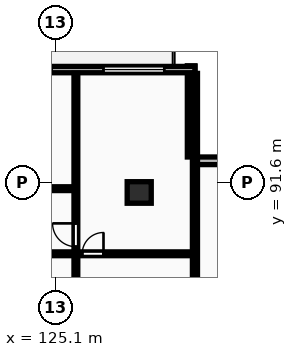
"""IFC4 building model, lengths in metres.
Left out: names, types, materials, properties, quantities, classifications, styles, units other than length and angle.
Written with IfcOpenShell. Run it as: python <this file> out.ifc"""

import sys

from ifc_helpers import new_model, si_unit, direction, frame, frame_2d, origin, origin_2d, place, context, subcontext, project, spatial, rectangle, extrude, element, fill, save


model = new_model("IFC4")
c1 = context("Model", 3, precision=1e-05, world=origin(), true_north=direction((0.0, 1.0)))
c2 = subcontext(c1, "Body", "Model", "MODEL_VIEW")
j1 = project(units=[si_unit("LENGTHUNIT", "METRE"), si_unit("PLANEANGLEUNIT", "RADIAN")], contexts=[c1])
p1 = place(None, origin())
s1 = spatial("IfcSite", under=j1, at=p1, CompositionType="ELEMENT")
p2 = place(p1, origin())
s2 = spatial("IfcBuilding", under=s1, at=p2, CompositionType="ELEMENT")
p3 = place(p2, frame((0.0, 0.0, 100.3)))
s3 = spatial("IfcBuildingStorey", under=s2, at=p3, CompositionType="ELEMENT", Elevation=100.3)
p4 = place(p3, frame((128.4, 91.2, 0.0), z_axis=(0.0, 0.0, 1.0), x_axis=(1.0, 0.0, 0.0)))
e1 = element("IfcColumn", 1, at=p4, inside=s3, PredefinedType="COLUMN", context=c2, shape_type="SweptSolid", body=[
    extrude(rectangle(XDim=0.95, YDim=0.85, at=origin_2d()), origin(), (0.0, 0.0, 1.0), 3.25),
])
for number, where, z_axis, x_axis in (
    (2, (134.2, 92.45, 0.0), (0.0, 0.0, 1.0), (-1.0, 0.0, 0.0)),
    (3, (130.45, 92.6, 0.0), (0.0, 0.0, 1.0), (0.0, 1.0, 0.0)),
):
    element("IfcWall", number, at=place(p3, frame(where, z_axis=z_axis, x_axis=x_axis)), inside=s3, PredefinedType="STANDARD", context=c2, shape_type="SweptSolid", body=[
        extrude(rectangle(XDim=3.6, YDim=0.3, at=frame_2d((1.8, 0.0))), origin(), (0.0, 0.0, 1.0), 2.97),
    ])
p5 = place(p3, frame((130.6, 96.05, 0.0), z_axis=(0.0, 0.0, 1.0), x_axis=(-1.0, 0.0, 0.0)))
e4 = element("IfcWall", 4, at=p5, inside=s3, PredefinedType="STANDARD", context=c2, shape_type="SweptSolid", body=[
    extrude(rectangle(XDim=73.0, YDim=0.25, at=frame_2d((36.5, 0.0))), origin(), (0.0, 0.0, 1.0), 2.97),
])
p6 = place(p5, frame((68.242, 0.0, 0.0)))
e5 = element("IfcOpeningElement", 5, at=p6, cuts=e4, PredefinedType="OPENING", context=c2, shape_type="SweptSolid", body=[
    extrude(rectangle(XDim=1.8, YDim=2.2, at=frame_2d((0.9, 1.1))), frame((0.0, 0.135, 0.0), z_axis=(0.0, -1.0, 0.0), x_axis=(1.0, 0.0, 0.0)), (0.0, 0.0, 1.0), 0.27),
])
p7 = place(p5, frame((59.046, 0.0, 0.85)))
e6 = element("IfcOpeningElement", 6, at=p7, cuts=e4, PredefinedType="OPENING", context=c2, shape_type="SweptSolid", body=[
    extrude(rectangle(XDim=2.4, YDim=1.9, at=frame_2d((1.2, 0.95))), frame((0.0, 0.135, 0.0), z_axis=(0.0, -1.0, 0.0), x_axis=(1.0, 0.0, 0.0)), (0.0, 0.0, 1.0), 0.27),
])
p8 = place(p5, frame((50.012, 0.0, 0.0)))
e7 = element("IfcOpeningElement", 7, at=p8, cuts=e4, PredefinedType="OPENING", context=c2, shape_type="SweptSolid", body=[
    extrude(rectangle(XDim=1.8, YDim=2.2, at=frame_2d((0.9, 1.1))), frame((0.0, 0.135, 0.0), z_axis=(0.0, -1.0, 0.0), x_axis=(1.0, 0.0, 0.0)), (0.0, 0.0, 1.0), 0.27),
])
p9 = place(p5, frame((40.536, 0.0, 0.85)))
e8 = element("IfcOpeningElement", 8, at=p9, cuts=e4, PredefinedType="OPENING", context=c2, shape_type="SweptSolid", body=[
    extrude(rectangle(XDim=2.4, YDim=1.9, at=frame_2d((1.2, 0.95))), frame((0.0, 0.135, 0.0), z_axis=(0.0, -1.0, 0.0), x_axis=(1.0, 0.0, 0.0)), (0.0, 0.0, 1.0), 0.27),
])
p10 = place(p5, frame((30.67, 0.0, 0.0)))
e9 = element("IfcOpeningElement", 9, at=p10, cuts=e4, PredefinedType="OPENING", context=c2, shape_type="SweptSolid", body=[
    extrude(rectangle(XDim=1.8, YDim=2.2, at=frame_2d((0.9, 1.1))), frame((0.0, 0.135, 0.0), z_axis=(0.0, -1.0, 0.0), x_axis=(1.0, 0.0, 0.0)), (0.0, 0.0, 1.0), 0.27),
])
p11 = place(p5, frame((20.781, 0.0, 0.0)))
e10 = element("IfcOpeningElement", 10, at=p11, cuts=e4, PredefinedType="OPENING", context=c2, shape_type="SweptSolid", body=[
    extrude(rectangle(XDim=1.8, YDim=2.2, at=frame_2d((0.9, 1.1))), frame((0.0, 0.135, 0.0), z_axis=(0.0, -1.0, 0.0), x_axis=(1.0, 0.0, 0.0)), (0.0, 0.0, 1.0), 0.27),
])
p12 = place(p5, frame((9.423, 0.0, 0.85)))
e11 = element("IfcOpeningElement", 11, at=p12, cuts=e4, PredefinedType="OPENING", context=c2, shape_type="SweptSolid", body=[
    extrude(rectangle(XDim=1.8, YDim=1.8, at=frame_2d((0.9, 0.9))), frame((0.0, 0.135, 0.0), z_axis=(0.0, -1.0, 0.0), x_axis=(1.0, 0.0, 0.0)), (0.0, 0.0, 1.0), 0.27),
])
p13 = place(p5, frame((5.66, 0.0, 0.85)))
e12 = element("IfcOpeningElement", 12, at=p13, cuts=e4, PredefinedType="OPENING", context=c2, shape_type="SweptSolid", body=[
    extrude(rectangle(XDim=1.8, YDim=1.8, at=frame_2d((0.9, 0.9))), frame((0.0, 0.135, 0.0), z_axis=(0.0, -1.0, 0.0), x_axis=(1.0, 0.0, 0.0)), (0.0, 0.0, 1.0), 0.27),
])
p14 = place(p5, frame((13.451, 0.0, 0.0)))
e13 = element("IfcOpeningElement", 13, at=p14, cuts=e4, PredefinedType="OPENING", context=c2, shape_type="SweptSolid", body=[
    extrude(rectangle(XDim=1.8, YDim=2.2, at=frame_2d((0.9, 1.1))), frame((0.0, 0.135, 0.0), z_axis=(0.0, -1.0, 0.0), x_axis=(1.0, 0.0, 0.0)), (0.0, 0.0, 1.0), 0.27),
])
p15 = place(p5, frame((1.21, 0.0, 0.85)))
e14 = element("IfcOpeningElement", 14, at=p15, cuts=e4, PredefinedType="OPENING", context=c2, shape_type="SweptSolid", body=[
    extrude(rectangle(XDim=2.4, YDim=1.9, at=frame_2d((1.2, 0.95))), frame((0.0, 0.135, 0.0), z_axis=(0.0, -1.0, 0.0), x_axis=(1.0, 0.0, 0.0)), (0.0, 0.0, 1.0), 0.27),
])
p16 = place(p3, frame((130.6, 69.83, 0.0), z_axis=(0.0, 0.0, 1.0), x_axis=(0.0, 1.0, 0.0)))
e15 = element("IfcWall", 15, at=p16, inside=s3, PredefinedType="PARTITIONING", context=c2, shape_type="SweptSolid", body=[
    extrude(rectangle(XDim=26.07, YDim=0.2, at=frame_2d((13.035, 0.0))), origin(), (0.0, 0.0, 1.0), 2.97),
])
p17 = place(p3, frame((125.9, 86.29, 0.0), z_axis=(0.0, 0.0, 1.0), x_axis=(0.0, 1.0, 0.0)))
e16 = element("IfcWall", 16, at=p17, inside=s3, PredefinedType="PARTITIONING", context=c2, shape_type="SweptSolid", body=[
    extrude(rectangle(XDim=2.47, YDim=0.15, at=frame_2d((1.235, 0.0))), origin(), (0.0, 0.0, 1.0), 2.97),
])
p18 = place(p3, frame((125.9, 88.8, 0.0), z_axis=(0.0, 0.0, 1.0), x_axis=(0.0, 1.0, 0.0)))
e17 = element("IfcWall", 17, at=p18, inside=s3, PredefinedType="PARTITIONING", context=c2, shape_type="SweptSolid", body=[
    extrude(rectangle(XDim=7.1, YDim=0.15, at=frame_2d((3.55, 0.0))), origin(), (0.0, 0.0, 1.0), 2.97),
])
p19 = place(p18, frame((0.26, 0.0, 0.0)))
e18 = element("IfcOpeningElement", 18, at=p19, cuts=e17, PredefinedType="OPENING", context=c2, shape_type="SweptSolid", body=[
    extrude(rectangle(XDim=0.92, YDim=2.08, at=frame_2d((0.46, 1.04))), frame((0.0, 0.085, 0.0), z_axis=(0.0, -1.0, 0.0), x_axis=(1.0, 0.0, 0.0)), (0.0, 0.0, 1.0), 0.17),
])
p20 = place(p3, frame((118.414, 88.78, 0.0), z_axis=(0.0, 0.0, 1.0), x_axis=(1.0, 0.0, 0.0)))
e19 = element("IfcWall", 19, at=p20, inside=s3, PredefinedType="PARTITIONING", context=c2, shape_type="SweptSolid", body=[
    extrude(rectangle(XDim=12.106, YDim=0.15, at=frame_2d((6.053, 0.0))), origin(), (0.0, 0.0, 1.0), 2.97),
])
p21 = place(p20, frame((5.633, 0.0, 0.0)))
e20 = element("IfcOpeningElement", 20, at=p21, cuts=e19, PredefinedType="OPENING", context=c2, shape_type="SweptSolid", body=[
    extrude(rectangle(XDim=0.84, YDim=2.04, at=frame_2d((0.42, 1.02))), frame((0.0, 0.085, 0.0), z_axis=(0.0, -1.0, 0.0), x_axis=(1.0, 0.0, 0.0)), (0.0, 0.0, 1.0), 0.17),
])
p22 = place(p20, frame((7.736, 0.0, 0.0)))
e21 = element("IfcOpeningElement", 21, at=p22, cuts=e19, PredefinedType="OPENING", context=c2, shape_type="SweptSolid", body=[
    extrude(rectangle(XDim=0.84, YDim=2.04, at=frame_2d((0.42, 1.02))), frame((0.0, 0.085, 0.0), z_axis=(0.0, -1.0, 0.0), x_axis=(1.0, 0.0, 0.0)), (0.0, 0.0, 1.0), 0.17),
])
p23 = place(p3, frame((114.084, 91.35, 0.0), z_axis=(0.0, 0.0, 1.0), x_axis=(1.0, 0.0, 0.0)))
e22 = element("IfcWall", 22, at=p23, inside=s3, PredefinedType="PARTITIONING", context=c2, shape_type="SweptSolid", body=[
    extrude(rectangle(XDim=11.816, YDim=0.15, at=frame_2d((5.908, 0.0))), origin(), (0.0, 0.0, 1.0), 2.663),
])
p24 = place(p23, frame((3.1, 0.0, 0.0)))
e23 = element("IfcOpeningElement", 23, at=p24, cuts=e22, PredefinedType="OPENING", context=c2, shape_type="SweptSolid", body=[
    extrude(rectangle(XDim=0.94, YDim=2.1, at=frame_2d((0.47, 1.05))), frame((0.0, 0.085, 0.0), z_axis=(0.0, -1.0, 0.0), x_axis=(1.0, 0.0, 0.0)), (0.0, 0.0, 1.0), 0.17),
])
p25 = place(p23, frame((4.51, 0.0, 0.0)))
e24 = element("IfcOpeningElement", 24, at=p25, cuts=e22, PredefinedType="OPENING", context=c2, shape_type="SweptSolid", body=[
    extrude(rectangle(XDim=0.88, YDim=2.06, at=frame_2d((0.44, 1.03))), frame((0.0, 0.085, 0.0), z_axis=(0.0, -1.0, 0.0), x_axis=(1.0, 0.0, 0.0)), (0.0, 0.0, 1.0), 0.17),
])
p26 = place(p23, frame((8.364, 0.0, 0.0)))
e25 = element("IfcOpeningElement", 25, at=p26, cuts=e22, PredefinedType="OPENING", context=c2, shape_type="SweptSolid", body=[
    extrude(rectangle(XDim=0.88, YDim=2.06, at=frame_2d((0.44, 1.03))), frame((0.0, 0.085, 0.0), z_axis=(0.0, -1.0, 0.0), x_axis=(1.0, 0.0, 0.0)), (0.0, 0.0, 1.0), 0.17),
])
p27 = place(p15, origin())
e26 = element("IfcWindow", 26, at=p27, inside=s3, PartitioningType="DOUBLE_PANEL_VERTICAL", PredefinedType="WINDOW", context=c2, shape_type="SweptSolid", body=[
    extrude(rectangle(XDim=2.4, YDim=1.9, at=frame_2d((1.2, 0.95))), frame((0.0, 0.03, 0.0), z_axis=(0.0, -1.0, 0.0), x_axis=(1.0, 0.0, 0.0)), (0.0, 0.0, 1.0), 0.06),
])
fill(e14, e26)
p28 = place(p19, origin())
e27 = element("IfcDoor", 27, at=p28, inside=s3, OperationType="SINGLE_SWING_RIGHT", PredefinedType="DOOR", context=c2, shape_type="SweptSolid", body=[
    extrude(rectangle(XDim=0.92, YDim=2.08, at=frame_2d((0.46, 1.04))), frame((0.0, 0.025, 0.0), z_axis=(0.0, -1.0, 0.0), x_axis=(1.0, 0.0, 0.0)), (0.0, 0.0, 1.0), 0.05),
])
fill(e18, e27)
p29 = place(p22, origin())
e28 = element("IfcDoor", 28, at=p29, inside=s3, OperationType="SINGLE_SWING_RIGHT", PredefinedType="DOOR", context=c2, shape_type="SweptSolid", body=[
    extrude(rectangle(XDim=0.84, YDim=2.04, at=frame_2d((0.42, 1.02))), frame((0.0, 0.025, 0.0), z_axis=(0.0, -1.0, 0.0), x_axis=(1.0, 0.0, 0.0)), (0.0, 0.0, 1.0), 0.05),
])
fill(e21, e28)
save(model, sys.argv[1])
